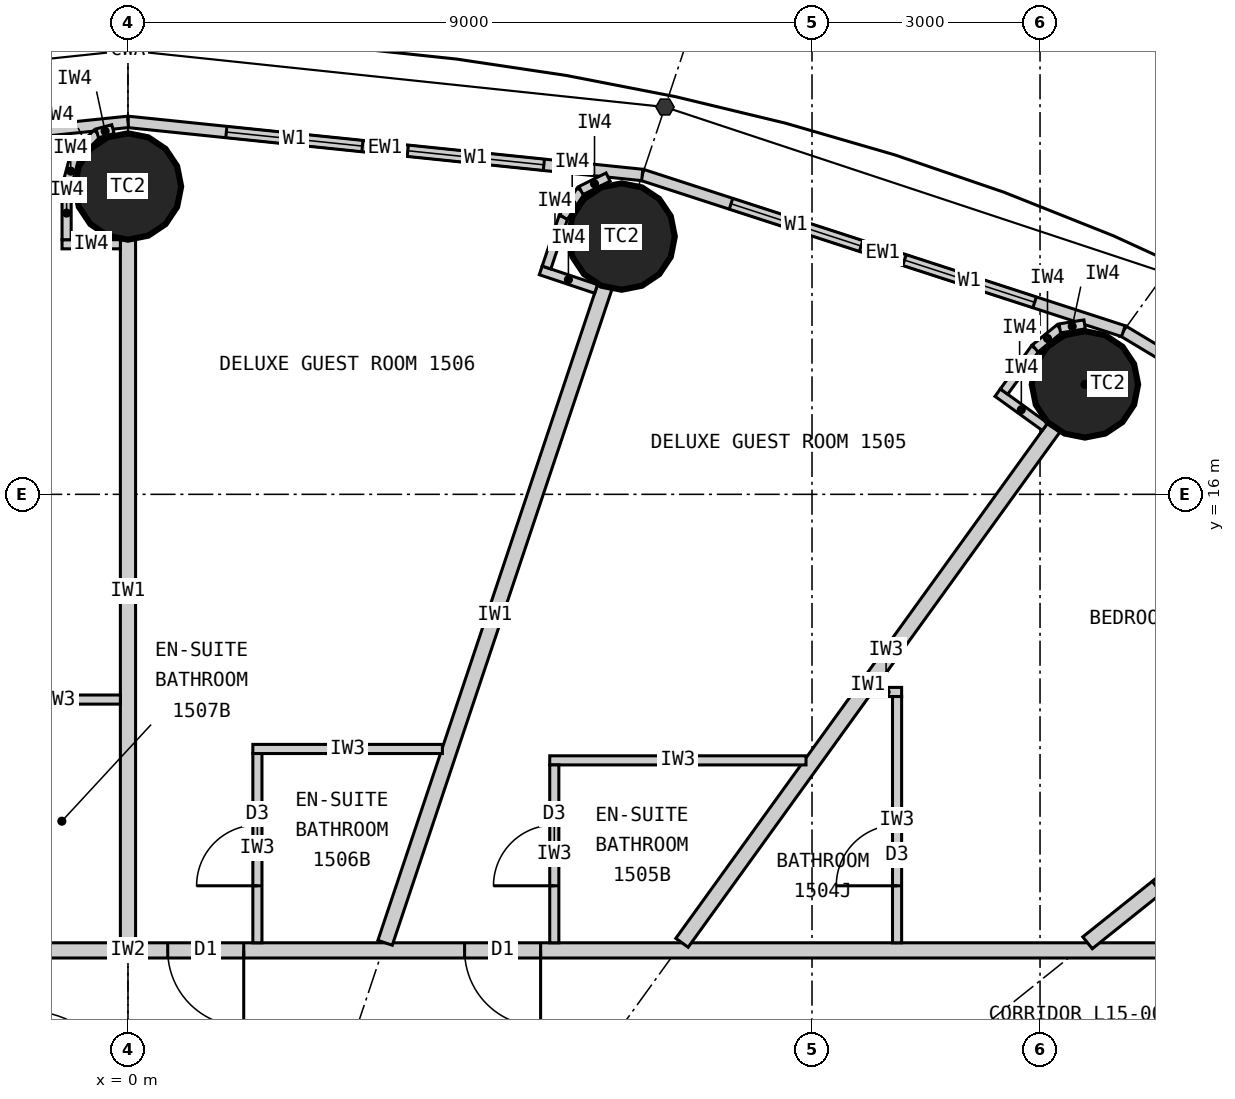
"""IFC4 building model, lengths in metres.
Left out: names, types, materials, properties, quantities, classifications, styles, units other than length and angle.
Written with IfcOpenShell. Run it as: python <this file> out.ifc"""

import sys

from ifc_helpers import new_model, si_unit, direction, frame, frame_2d, origin, origin_2d, place, context, subcontext, project, spatial, rectangle, circle, extrude, element, fill, save


model = new_model("IFC4")
c1 = context("Model", 3, precision=1e-05, world=origin(), true_north=direction((0.0, 1.0)))
c2 = subcontext(c1, "Body", "Model", "MODEL_VIEW")
j1 = project(units=[si_unit("LENGTHUNIT", "METRE"), si_unit("PLANEANGLEUNIT", "RADIAN")], contexts=[c1])
p1 = place(None, origin())
s1 = spatial("IfcSite", under=j1, at=p1, CompositionType="ELEMENT")
p2 = place(p1, origin())
s2 = spatial("IfcBuilding", under=s1, at=p2, CompositionType="ELEMENT")
p3 = place(p2, frame((0.0, 0.0, 63.9)))
s3 = spatial("IfcBuildingStorey", under=s2, at=p3, CompositionType="ELEMENT", Elevation=63.9)
for number, where, z_axis, x_axis in (
    (1, (12.591, 17.447, 0.0), (0.0, 0.0, 1.0), (1.0, 0.0, 0.0)),
    (2, (6.495, 19.391, 0.0), (0.0, 0.0, 1.0), (1.0, 0.0, 0.0)),
    (3, (0.0, 20.05, 0.0), (0.0, 0.0, 1.0), (1.0, 0.0, 0.0)),
):
    element("IfcColumn", number, at=place(p3, frame(where, z_axis=z_axis, x_axis=x_axis)), inside=s3, PredefinedType="COLUMN", context=c2, shape_type="SweptSolid", body=[
        extrude(circle(Radius=0.7, at=origin_2d()), origin(), (0.0, 0.0, 1.0), 3.3),
    ])
p4 = place(p3, frame((18.57, 14.856, 0.0), z_axis=(0.0, 0.0, 1.0), x_axis=(-0.856983180864, 0.515344377787, 0.0)))
e4 = element("IfcWall", 4, at=p4, inside=s3, PredefinedType="ELEMENTEDWALL", context=c2, shape_type="SweptSolid", body=[
    extrude(rectangle(XDim=6.386, YDim=0.15, at=frame_2d((3.193, 0.0))), origin(), (0.0, 0.0, 1.0), 3.12),
])
p5 = place(p4, frame((1.093, 0.0, 0.9)))
e5 = element("IfcOpeningElement", 5, at=p5, cuts=e4, PredefinedType="OPENING", context=c2, shape_type="SweptSolid", body=[
    extrude(rectangle(XDim=1.8, YDim=1.9, at=frame_2d((0.9, 0.95))), frame((0.0, 0.085, 0.0), z_axis=(0.0, -1.0, 0.0), x_axis=(1.0, 0.0, 0.0)), (0.0, 0.0, 1.0), 0.17),
])
p6 = place(p4, frame((3.493, 0.0, 0.9)))
e6 = element("IfcOpeningElement", 6, at=p6, cuts=e4, PredefinedType="OPENING", context=c2, shape_type="SweptSolid", body=[
    extrude(rectangle(XDim=1.8, YDim=1.9, at=frame_2d((0.9, 0.95))), frame((0.0, 0.085, 0.0), z_axis=(0.0, -1.0, 0.0), x_axis=(1.0, 0.0, 0.0)), (0.0, 0.0, 1.0), 0.17),
])
p7 = place(p3, frame((13.096, 18.147, 0.0), z_axis=(0.0, 0.0, 1.0), x_axis=(-0.951137534625, 0.308767534285, 0.0)))
e7 = element("IfcWall", 7, at=p7, inside=s3, PredefinedType="ELEMENTEDWALL", context=c2, shape_type="SweptSolid", body=[
    extrude(rectangle(XDim=6.655, YDim=0.15, at=frame_2d((3.328, 0.0))), origin(), (0.0, 0.0, 1.0), 3.12),
])
p8 = place(p7, frame((1.228, 0.0, 0.9)))
e8 = element("IfcOpeningElement", 8, at=p8, cuts=e7, PredefinedType="OPENING", context=c2, shape_type="SweptSolid", body=[
    extrude(rectangle(XDim=1.8, YDim=1.9, at=frame_2d((0.9, 0.95))), frame((0.0, 0.085, 0.0), z_axis=(0.0, -1.0, 0.0), x_axis=(1.0, 0.0, 0.0)), (0.0, 0.0, 1.0), 0.17),
])
p9 = place(p7, frame((3.628, 0.0, 0.9)))
e9 = element("IfcOpeningElement", 9, at=p9, cuts=e7, PredefinedType="OPENING", context=c2, shape_type="SweptSolid", body=[
    extrude(rectangle(XDim=1.8, YDim=1.9, at=frame_2d((0.9, 0.95))), frame((0.0, 0.085, 0.0), z_axis=(0.0, -1.0, 0.0), x_axis=(1.0, 0.0, 0.0)), (0.0, 0.0, 1.0), 0.17),
])
p10 = place(p3, frame((6.766, 20.202, 0.0), z_axis=(0.0, 0.0, 1.0), x_axis=(-0.994721394369, 0.102612609291, 0.0)))
e10 = element("IfcWall", 10, at=p10, inside=s3, PredefinedType="ELEMENTEDWALL", context=c2, shape_type="SweptSolid", body=[
    extrude(rectangle(XDim=6.802, YDim=0.15, at=frame_2d((3.401, 0.0))), origin(), (0.0, 0.0, 1.0), 3.12),
])
p11 = place(p10, frame((1.301, 0.0, 0.9)))
e11 = element("IfcOpeningElement", 11, at=p11, cuts=e10, PredefinedType="OPENING", context=c2, shape_type="SweptSolid", body=[
    extrude(rectangle(XDim=1.8, YDim=1.9, at=frame_2d((0.9, 0.95))), frame((0.0, 0.085, 0.0), z_axis=(0.0, -1.0, 0.0), x_axis=(1.0, 0.0, 0.0)), (0.0, 0.0, 1.0), 0.17),
])
p12 = place(p10, frame((3.701, 0.0, 0.9)))
e12 = element("IfcOpeningElement", 12, at=p12, cuts=e10, PredefinedType="OPENING", context=c2, shape_type="SweptSolid", body=[
    extrude(rectangle(XDim=1.8, YDim=1.9, at=frame_2d((0.9, 0.95))), frame((0.0, 0.085, 0.0), z_axis=(0.0, -1.0, 0.0), x_axis=(1.0, 0.0, 0.0)), (0.0, 0.0, 1.0), 0.17),
])
p13 = place(p3, frame((0.0, 20.9, 0.0), z_axis=(0.0, 0.0, 1.0), x_axis=(-0.994721394369, -0.102612609291, 0.0)))
e13 = element("IfcWall", 13, at=p13, inside=s3, PredefinedType="ELEMENTEDWALL", context=c2, shape_type="SweptSolid", body=[
    extrude(rectangle(XDim=6.802, YDim=0.15, at=frame_2d((3.401, 0.0))), origin(), (0.0, 0.0, 1.0), 3.12),
])
p14 = place(p13, frame((1.301, 0.0, 0.9)))
e14 = element("IfcOpeningElement", 14, at=p14, cuts=e13, PredefinedType="OPENING", context=c2, shape_type="SweptSolid", body=[
    extrude(rectangle(XDim=1.8, YDim=1.9, at=frame_2d((0.9, 0.95))), frame((0.0, 0.085, 0.0), z_axis=(0.0, -1.0, 0.0), x_axis=(1.0, 0.0, 0.0)), (0.0, 0.0, 1.0), 0.17),
])
p15 = place(p13, frame((3.701, 0.0, 0.9)))
e15 = element("IfcOpeningElement", 15, at=p15, cuts=e13, PredefinedType="OPENING", context=c2, shape_type="SweptSolid", body=[
    extrude(rectangle(XDim=1.8, YDim=1.9, at=frame_2d((0.9, 0.95))), frame((0.0, 0.085, 0.0), z_axis=(0.0, -1.0, 0.0), x_axis=(1.0, 0.0, 0.0)), (0.0, 0.0, 1.0), 0.17),
])
p16 = place(p3, frame((-14.1, 10.0, 0.0), z_axis=(0.0, 0.0, 1.0), x_axis=(1.0, 0.0, 0.0)))
e16 = element("IfcWall", 16, at=p16, inside=s3, PredefinedType="PARTITIONING", context=c2, shape_type="SweptSolid", body=[
    extrude(rectangle(XDim=28.2, YDim=0.2, at=frame_2d((14.1, 0.0))), origin(), (0.0, 0.0, 1.0), 3.12),
])
p17 = place(p16, frame((18.529, 0.0, 0.0)))
e17 = element("IfcOpeningElement", 17, at=p17, cuts=e16, PredefinedType="OPENING", context=c2, shape_type="SweptSolid", body=[
    extrude(rectangle(XDim=1.0, YDim=2.2, at=frame_2d((0.5, 1.1))), frame((0.0, 0.11, 0.0), z_axis=(0.0, -1.0, 0.0), x_axis=(1.0, 0.0, 0.0)), (0.0, 0.0, 1.0), 0.22),
])
p18 = place(p16, frame((14.623, 0.0, 0.0)))
e18 = element("IfcOpeningElement", 18, at=p18, cuts=e16, PredefinedType="OPENING", context=c2, shape_type="SweptSolid", body=[
    extrude(rectangle(XDim=1.0, YDim=2.2, at=frame_2d((0.5, 1.1))), frame((0.0, 0.11, 0.0), z_axis=(0.0, -1.0, 0.0), x_axis=(1.0, 0.0, 0.0)), (0.0, 0.0, 1.0), 0.22),
])
p19 = place(p16, frame((11.24, 0.0, 0.0)))
e19 = element("IfcOpeningElement", 19, at=p19, cuts=e16, PredefinedType="OPENING", context=c2, shape_type="SweptSolid", body=[
    extrude(rectangle(XDim=1.0, YDim=2.2, at=frame_2d((0.5, 1.1))), frame((0.0, 0.11, 0.0), z_axis=(0.0, -1.0, 0.0), x_axis=(1.0, 0.0, 0.0)), (0.0, 0.0, 1.0), 0.22),
])
p20 = place(p16, frame((8.671, 0.0, 0.0)))
e20 = element("IfcOpeningElement", 20, at=p20, cuts=e16, PredefinedType="OPENING", context=c2, shape_type="SweptSolid", body=[
    extrude(rectangle(XDim=1.0, YDim=2.2, at=frame_2d((0.5, 1.1))), frame((0.0, 0.11, 0.0), z_axis=(0.0, -1.0, 0.0), x_axis=(1.0, 0.0, 0.0)), (0.0, 0.0, 1.0), 0.22),
])
p21 = place(p16, frame((2.801, 0.0, 0.0)))
e21 = element("IfcOpeningElement", 21, at=p21, cuts=e16, PredefinedType="OPENING", context=c2, shape_type="SweptSolid", body=[
    extrude(rectangle(XDim=1.0, YDim=2.2, at=frame_2d((0.5, 1.1))), frame((0.0, 0.11, 0.0), z_axis=(0.0, -1.0, 0.0), x_axis=(1.0, 0.0, 0.0)), (0.0, 0.0, 1.0), 0.22),
])
p22 = place(p3, frame((12.625, 10.1, 0.0), z_axis=(0.0, 0.0, 1.0), x_axis=(0.780892451574, 0.624665493744, 0.0)))
e22 = element("IfcWall", 22, at=p22, inside=s3, PredefinedType="PARTITIONING", context=c2, shape_type="SweptSolid", body=[
    extrude(rectangle(XDim=6.045, YDim=0.2, at=frame_2d((3.022, 0.0))), origin(), (0.0, 0.0, 1.0), 2.32),
])
p23 = place(p22, frame((1.17, 0.0, 0.0)))
e23 = element("IfcOpeningElement", 23, at=p23, cuts=e22, PredefinedType="OPENING", context=c2, shape_type="SweptSolid", body=[
    extrude(rectangle(XDim=0.9, YDim=2.1, at=frame_2d((0.45, 1.05))), frame((0.0, 0.11, 0.0), z_axis=(0.0, -1.0, 0.0), x_axis=(1.0, 0.0, 0.0)), (0.0, 0.0, 1.0), 0.22),
])
p24 = place(p3, frame((7.289, 10.1, 0.0), z_axis=(0.0, 0.0, 1.0), x_axis=(0.585198353053, 0.810890182197, 0.0)))
e24 = element("IfcWall", 24, at=p24, inside=s3, PredefinedType="PARTITIONING", context=c2, shape_type="SweptSolid", body=[
    extrude(rectangle(XDim=8.36, YDim=0.2, at=frame_2d((4.18, 0.0))), origin(), (0.0, 0.0, 1.0), 2.32),
])
p25 = place(p3, frame((3.383, 10.1, 0.0), z_axis=(0.0, 0.0, 1.0), x_axis=(0.31759592231, 0.948226149256, 0.0)))
e25 = element("IfcWall", 25, at=p25, inside=s3, PredefinedType="PARTITIONING", context=c2, shape_type="SweptSolid", body=[
    extrude(rectangle(XDim=9.098, YDim=0.2, at=frame_2d((4.549, 0.0))), origin(), (0.0, 0.0, 1.0), 2.32),
])
p26 = place(p3, frame((0.0, 10.1, 0.0), z_axis=(0.0, 0.0, 1.0), x_axis=(0.0, 1.0, 0.0)))
e26 = element("IfcWall", 26, at=p26, inside=s3, PredefinedType="PARTITIONING", context=c2, shape_type="SweptSolid", body=[
    extrude(rectangle(XDim=9.25, YDim=0.2, at=frame_2d((4.625, 0.0))), origin(), (0.0, 0.0, 1.0), 2.32),
])
p27 = place(p3, frame((9.771, 13.4, 0.0), z_axis=(0.0, 0.0, 1.0), x_axis=(1.0, 0.0, 0.0)))
e27 = element("IfcWall", 27, at=p27, inside=s3, PredefinedType="PARTITIONING", context=c2, shape_type="SweptSolid", body=[
    extrude(rectangle(XDim=0.408, YDim=0.12, at=frame_2d((0.204, 0.0))), origin(), (0.0, 0.0, 1.0), 3.12),
])
p28 = place(p3, frame((10.119, 10.1, 0.0), z_axis=(0.0, 0.0, 1.0), x_axis=(0.0, 1.0, 0.0)))
e28 = element("IfcWall", 28, at=p28, inside=s3, PredefinedType="PARTITIONING", context=c2, shape_type="SweptSolid", body=[
    extrude(rectangle(XDim=3.24, YDim=0.12, at=frame_2d((1.62, 0.0))), origin(), (0.0, 0.0, 1.0), 3.12),
])
p29 = place(p28, frame((0.75, 0.0, 0.0)))
e29 = element("IfcOpeningElement", 29, at=p29, cuts=e28, PredefinedType="OPENING", context=c2, shape_type="SweptSolid", body=[
    extrude(rectangle(XDim=0.8, YDim=2.1, at=frame_2d((0.4, 1.05))), frame((0.0, 0.07, 0.0), z_axis=(0.0, -1.0, 0.0), x_axis=(1.0, 0.0, 0.0)), (0.0, 0.0, 1.0), 0.14),
])
p30 = place(p3, frame((8.921, 12.5, 0.0), z_axis=(0.0, 0.0, 1.0), x_axis=(-1.0, 0.0, 0.0)))
e30 = element("IfcWall", 30, at=p30, inside=s3, PredefinedType="PARTITIONING", context=c2, shape_type="SweptSolid", body=[
    extrude(rectangle(XDim=3.372, YDim=0.12, at=frame_2d((1.686, 0.0))), origin(), (0.0, 0.0, 1.0), 3.12),
])
p31 = place(p3, frame((5.609, 10.1, 0.0), z_axis=(0.0, 0.0, 1.0), x_axis=(0.0, 1.0, 0.0)))
e31 = element("IfcWall", 31, at=p31, inside=s3, PredefinedType="PARTITIONING", context=c2, shape_type="SweptSolid", body=[
    extrude(rectangle(XDim=2.34, YDim=0.12, at=frame_2d((1.17, 0.0))), origin(), (0.0, 0.0, 1.0), 3.12),
])
p32 = place(p31, frame((0.75, 0.0, 0.0)))
e32 = element("IfcOpeningElement", 32, at=p32, cuts=e31, PredefinedType="OPENING", context=c2, shape_type="SweptSolid", body=[
    extrude(rectangle(XDim=0.8, YDim=2.1, at=frame_2d((0.4, 1.05))), frame((0.0, 0.07, 0.0), z_axis=(0.0, -1.0, 0.0), x_axis=(1.0, 0.0, 0.0)), (0.0, 0.0, 1.0), 0.14),
])
p33 = place(p3, frame((4.137, 12.65, 0.0), z_axis=(0.0, 0.0, 1.0), x_axis=(-1.0, 0.0, 0.0)))
e33 = element("IfcWall", 33, at=p33, inside=s3, PredefinedType="PARTITIONING", context=c2, shape_type="SweptSolid", body=[
    extrude(rectangle(XDim=2.494, YDim=0.12, at=frame_2d((1.247, 0.0))), origin(), (0.0, 0.0, 1.0), 3.12),
])
p34 = place(p3, frame((1.703, 10.1, 0.0), z_axis=(0.0, 0.0, 1.0), x_axis=(0.0, 1.0, 0.0)))
e34 = element("IfcWall", 34, at=p34, inside=s3, PredefinedType="PARTITIONING", context=c2, shape_type="SweptSolid", body=[
    extrude(rectangle(XDim=2.49, YDim=0.12, at=frame_2d((1.245, 0.0))), origin(), (0.0, 0.0, 1.0), 3.12),
])
p35 = place(p34, frame((0.75, 0.0, 0.0)))
e35 = element("IfcOpeningElement", 35, at=p35, cuts=e34, PredefinedType="OPENING", context=c2, shape_type="SweptSolid", body=[
    extrude(rectangle(XDim=0.8, YDim=2.1, at=frame_2d((0.4, 1.05))), frame((0.0, 0.07, 0.0), z_axis=(0.0, -1.0, 0.0), x_axis=(1.0, 0.0, 0.0)), (0.0, 0.0, 1.0), 0.14),
])
p36 = place(p3, frame((-0.1, 13.3, 0.0), z_axis=(0.0, 0.0, 1.0), x_axis=(-1.0, 0.0, 0.0)))
e36 = element("IfcWall", 36, at=p36, inside=s3, PredefinedType="PARTITIONING", context=c2, shape_type="SweptSolid", body=[
    extrude(rectangle(XDim=1.64, YDim=0.12, at=frame_2d((0.82, 0.0))), origin(), (0.0, 0.0, 1.0), 3.12),
])
p37 = place(p3, frame((12.065, 16.889, 0.0), z_axis=(0.0, 0.0, 1.0), x_axis=(-0.810821798253, 0.585293098778, 0.0)))
e37 = element("IfcWall", 37, at=p37, inside=s3, PredefinedType="PARTITIONING", context=c2, shape_type="SweptSolid", body=[
    extrude(rectangle(XDim=0.768, YDim=0.12, at=frame_2d((0.384, 0.0))), origin(), (0.0, 0.0, 1.0), 3.12),
])
p38 = place(p3, frame((11.526, 17.351, 0.0), z_axis=(0.0, 0.0, 1.0), x_axis=(0.585223113993, 0.810872312296, 0.0)))
e38 = element("IfcWall", 38, at=p38, inside=s3, PredefinedType="PARTITIONING", context=c2, shape_type="SweptSolid", body=[
    extrude(rectangle(XDim=0.7, YDim=0.12, at=frame_2d((0.35, 0.0))), origin(), (0.0, 0.0, 1.0), 3.12),
])
p39 = place(p3, frame((11.936, 17.919, 0.0), z_axis=(0.0, 0.0, 1.0), x_axis=(0.775023088441, 0.631932917629, 0.0)))
e39 = element("IfcWall", 39, at=p39, inside=s3, PredefinedType="PARTITIONING", context=c2, shape_type="SweptSolid", body=[
    extrude(rectangle(XDim=0.418, YDim=0.12, at=frame_2d((0.209, 0.0))), origin(), (0.0, 0.0, 1.0), 3.12),
])
p40 = place(p3, frame((12.26, 18.183, 0.0), z_axis=(0.0, 0.0, 1.0), x_axis=(0.987218661664, 0.159371622511, 0.0)))
e40 = element("IfcWall", 40, at=p40, inside=s3, PredefinedType="PARTITIONING", context=c2, shape_type="SweptSolid", body=[
    extrude(rectangle(XDim=0.331, YDim=0.12, at=frame_2d((0.166, 0.0))), origin(), (0.0, 0.0, 1.0), 3.12),
])
p41 = place(p3, frame((6.159, 18.702, 0.0), z_axis=(0.0, 0.0, 1.0), x_axis=(-0.948173154049, 0.31775410295, 0.0)))
e41 = element("IfcWall", 41, at=p41, inside=s3, PredefinedType="PARTITIONING", context=c2, shape_type="SweptSolid", body=[
    extrude(rectangle(XDim=0.768, YDim=0.12, at=frame_2d((0.384, 0.0))), origin(), (0.0, 0.0, 1.0), 3.12),
])
p42 = place(p3, frame((5.507, 18.984, 0.0), z_axis=(0.0, 0.0, 1.0), x_axis=(0.317692050622, 0.948193946918, 0.0)))
e42 = element("IfcWall", 42, at=p42, inside=s3, PredefinedType="PARTITIONING", context=c2, shape_type="SweptSolid", body=[
    extrude(rectangle(XDim=0.7, YDim=0.12, at=frame_2d((0.35, 0.0))), origin(), (0.0, 0.0, 1.0), 3.12),
])
p43 = place(p3, frame((5.729, 19.648, 0.0), z_axis=(0.0, 0.0, 1.0), x_axis=(0.552135764955, 0.833754218615, 0.0)))
e43 = element("IfcWall", 43, at=p43, inside=s3, PredefinedType="PARTITIONING", context=c2, shape_type="SweptSolid", body=[
    extrude(rectangle(XDim=0.418, YDim=0.12, at=frame_2d((0.209, 0.0))), origin(), (0.0, 0.0, 1.0), 3.12),
])
p44 = place(p3, frame((5.96, 19.996, 0.0), z_axis=(0.0, 0.0, 1.0), x_axis=(0.895160725913, 0.445743507842, 0.0)))
e44 = element("IfcWall", 44, at=p44, inside=s3, PredefinedType="PARTITIONING", context=c2, shape_type="SweptSolid", body=[
    extrude(rectangle(XDim=0.399, YDim=0.12, at=frame_2d((0.199, 0.0))), origin(), (0.0, 0.0, 1.0), 3.12),
])
p45 = place(p3, frame((-0.1, 19.29, 0.0), z_axis=(0.0, 0.0, 1.0), x_axis=(-1.0, 0.0, 0.0)))
e45 = element("IfcWall", 45, at=p45, inside=s3, PredefinedType="PARTITIONING", context=c2, shape_type="SweptSolid", body=[
    extrude(rectangle(XDim=0.767, YDim=0.12, at=frame_2d((0.384, 0.0))), origin(), (0.0, 0.0, 1.0), 3.12),
])
p46 = place(p3, frame((-0.808, 19.35, 0.0), z_axis=(0.0, 0.0, 1.0), x_axis=(0.0, 1.0, 0.0)))
e46 = element("IfcWall", 46, at=p46, inside=s3, PredefinedType="PARTITIONING", context=c2, shape_type="SweptSolid", body=[
    extrude(rectangle(XDim=0.7, YDim=0.12, at=frame_2d((0.35, 0.0))), origin(), (0.0, 0.0, 1.0), 3.12),
])
p47 = place(p3, frame((-0.808, 20.05, 0.0), z_axis=(0.0, 0.0, 1.0), x_axis=(0.2592614205, 0.965807183573, 0.0)))
e47 = element("IfcWall", 47, at=p47, inside=s3, PredefinedType="PARTITIONING", context=c2, shape_type="SweptSolid", body=[
    extrude(rectangle(XDim=0.418, YDim=0.12, at=frame_2d((0.209, 0.0))), origin(), (0.0, 0.0, 1.0), 3.12),
])
p48 = place(p3, frame((-0.699, 20.454, 0.0), z_axis=(0.0, 0.0, 1.0), x_axis=(0.707106781187, 0.707106781187, 0.0)))
e48 = element("IfcWall", 48, at=p48, inside=s3, PredefinedType="PARTITIONING", context=c2, shape_type="SweptSolid", body=[
    extrude(rectangle(XDim=0.418, YDim=0.12, at=frame_2d((0.209, 0.0))), origin(), (0.0, 0.0, 1.0), 3.12),
])
p49 = place(p3, frame((-0.404, 20.749, 0.0), z_axis=(0.0, 0.0, 1.0), x_axis=(0.965759066438, 0.25944060128, 0.0)))
e49 = element("IfcWall", 49, at=p49, inside=s3, PredefinedType="PARTITIONING", context=c2, shape_type="SweptSolid", body=[
    extrude(rectangle(XDim=0.214, YDim=0.12, at=frame_2d((0.107, 0.0))), origin(), (0.0, 0.0, 1.0), 3.12),
])
p50 = place(p8, origin())
e50 = element("IfcWindow", 50, at=p50, inside=s3, PartitioningType="SINGLE_PANEL", PredefinedType="WINDOW", context=c2, shape_type="SweptSolid", body=[
    extrude(rectangle(XDim=1.8, YDim=1.9, at=frame_2d((0.9, 0.95))), frame((0.0, 0.03, 0.0), z_axis=(0.0, -1.0, 0.0), x_axis=(1.0, 0.0, 0.0)), (0.0, 0.0, 1.0), 0.06),
])
fill(e8, e50)
p51 = place(p9, origin())
e51 = element("IfcWindow", 51, at=p51, inside=s3, PartitioningType="SINGLE_PANEL", PredefinedType="WINDOW", context=c2, shape_type="SweptSolid", body=[
    extrude(rectangle(XDim=1.8, YDim=1.9, at=frame_2d((0.9, 0.95))), frame((0.0, 0.03, 0.0), z_axis=(0.0, -1.0, 0.0), x_axis=(1.0, 0.0, 0.0)), (0.0, 0.0, 1.0), 0.06),
])
fill(e9, e51)
p52 = place(p11, origin())
e52 = element("IfcWindow", 52, at=p52, inside=s3, PartitioningType="SINGLE_PANEL", PredefinedType="WINDOW", context=c2, shape_type="SweptSolid", body=[
    extrude(rectangle(XDim=1.8, YDim=1.9, at=frame_2d((0.9, 0.95))), frame((0.0, 0.03, 0.0), z_axis=(0.0, -1.0, 0.0), x_axis=(1.0, 0.0, 0.0)), (0.0, 0.0, 1.0), 0.06),
])
fill(e11, e52)
p53 = place(p12, origin())
e53 = element("IfcWindow", 53, at=p53, inside=s3, PartitioningType="SINGLE_PANEL", PredefinedType="WINDOW", context=c2, shape_type="SweptSolid", body=[
    extrude(rectangle(XDim=1.8, YDim=1.9, at=frame_2d((0.9, 0.95))), frame((0.0, 0.03, 0.0), z_axis=(0.0, -1.0, 0.0), x_axis=(1.0, 0.0, 0.0)), (0.0, 0.0, 1.0), 0.06),
])
fill(e12, e53)
p54 = place(p29, origin())
e54 = element("IfcDoor", 54, at=p54, inside=s3, OperationType="SINGLE_SWING_LEFT", PredefinedType="DOOR", context=c2, shape_type="SweptSolid", body=[
    extrude(rectangle(XDim=0.8, YDim=2.1, at=frame_2d((0.4, 1.05))), frame((0.0, 0.025, 0.0), z_axis=(0.0, -1.0, 0.0), x_axis=(1.0, 0.0, 0.0)), (0.0, 0.0, 1.0), 0.05),
])
fill(e29, e54)
p55 = place(p32, origin())
e55 = element("IfcDoor", 55, at=p55, inside=s3, OperationType="SINGLE_SWING_LEFT", PredefinedType="DOOR", context=c2, shape_type="SweptSolid", body=[
    extrude(rectangle(XDim=0.8, YDim=2.1, at=frame_2d((0.4, 1.05))), frame((0.0, 0.025, 0.0), z_axis=(0.0, -1.0, 0.0), x_axis=(1.0, 0.0, 0.0)), (0.0, 0.0, 1.0), 0.05),
])
fill(e32, e55)
p56 = place(p17, origin())
e56 = element("IfcDoor", 56, at=p56, inside=s3, OperationType="SINGLE_SWING_RIGHT", PredefinedType="DOOR", context=c2, shape_type="SweptSolid", body=[
    extrude(rectangle(XDim=1.0, YDim=2.2, at=frame_2d((0.5, 1.1))), frame((0.0, 0.025, 0.0), z_axis=(0.0, -1.0, 0.0), x_axis=(1.0, 0.0, 0.0)), (0.0, 0.0, 1.0), 0.05),
])
fill(e17, e56)
p57 = place(p35, origin())
e57 = element("IfcDoor", 57, at=p57, inside=s3, OperationType="SINGLE_SWING_LEFT", PredefinedType="DOOR", context=c2, shape_type="SweptSolid", body=[
    extrude(rectangle(XDim=0.8, YDim=2.1, at=frame_2d((0.4, 1.05))), frame((0.0, 0.025, 0.0), z_axis=(0.0, -1.0, 0.0), x_axis=(1.0, 0.0, 0.0)), (0.0, 0.0, 1.0), 0.05),
])
fill(e35, e57)
p58 = place(p18, origin())
e58 = element("IfcDoor", 58, at=p58, inside=s3, OperationType="SINGLE_SWING_RIGHT", PredefinedType="DOOR", context=c2, shape_type="SweptSolid", body=[
    extrude(rectangle(XDim=1.0, YDim=2.2, at=frame_2d((0.5, 1.1))), frame((0.0, 0.025, 0.0), z_axis=(0.0, -1.0, 0.0), x_axis=(1.0, 0.0, 0.0)), (0.0, 0.0, 1.0), 0.05),
])
fill(e18, e58)
save(model, sys.argv[1])
